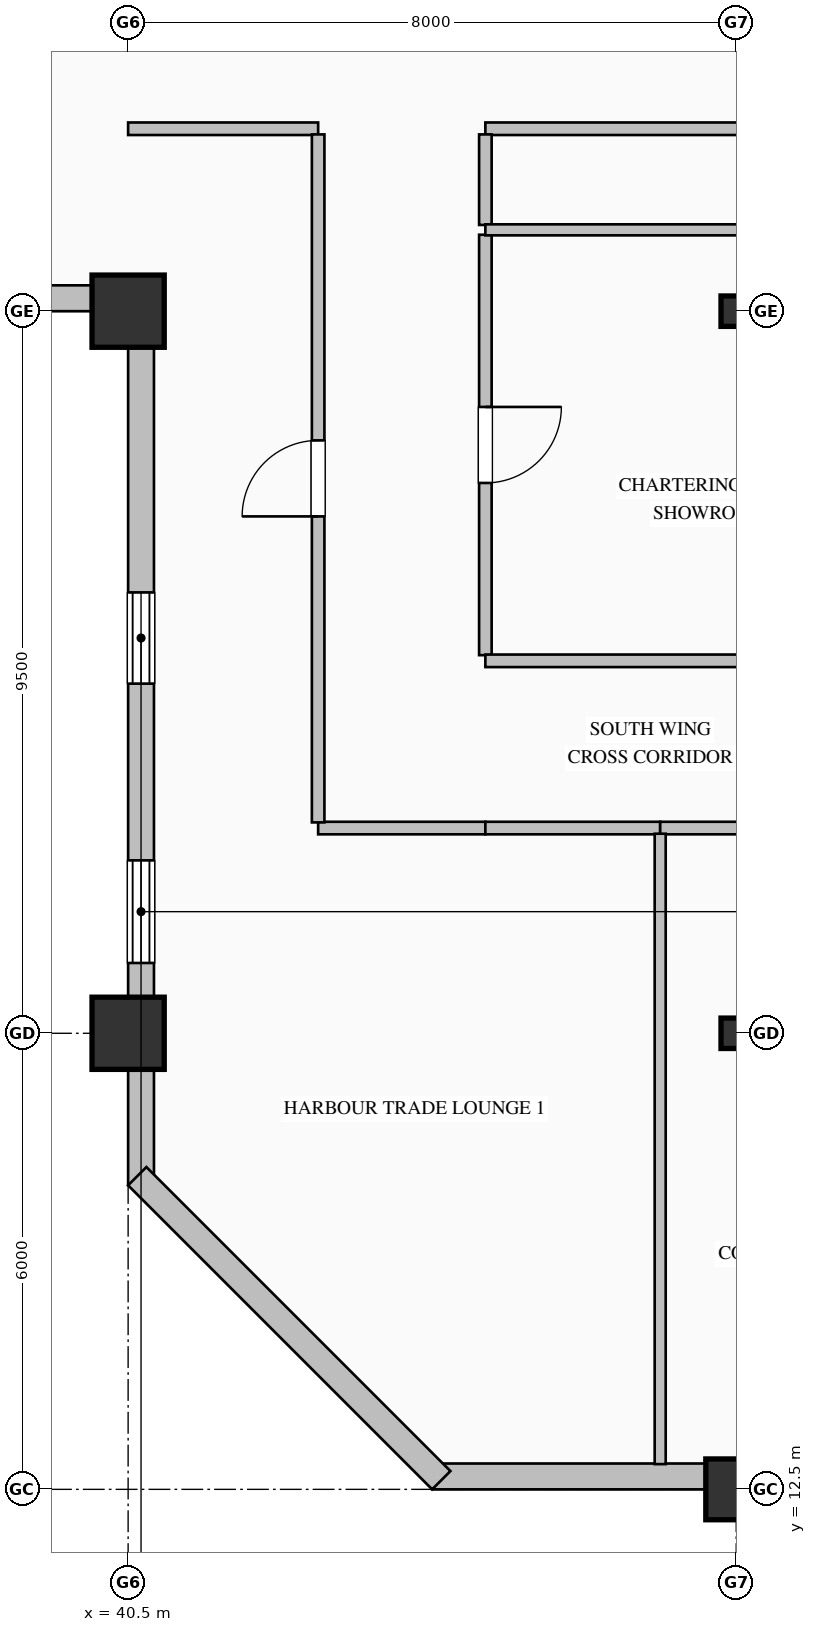
"""IFC4 building model, lengths in metres.
Left out: names, types, materials, properties, quantities, classifications, styles, units other than length and angle.
Written with IfcOpenShell. Run it as: python <this file> out.ifc"""

import sys

from ifc_helpers import new_model, si_unit, direction, frame, frame_2d, origin, origin_2d, place, context, subcontext, project, spatial, rectangle, hollow_rectangle, i_section, extrude, element, fill, save


model = new_model("IFC4")
c1 = context("Model", 3, precision=1e-05, world=origin(), true_north=direction((0.0, 1.0)))
c2 = subcontext(c1, "Body", "Model", "MODEL_VIEW")
j1 = project(units=[si_unit("LENGTHUNIT", "METRE"), si_unit("PLANEANGLEUNIT", "RADIAN")], contexts=[c1])
p1 = place(None, origin())
s1 = spatial("IfcSite", under=j1, at=p1, CompositionType="ELEMENT")
p2 = place(p1, origin())
s2 = spatial("IfcBuilding", under=s1, at=p2, CompositionType="ELEMENT")
p3 = place(p2, frame((0.0, 0.0, 265.8)))
s3 = spatial("IfcBuildingStorey", under=s2, at=p3, CompositionType="ELEMENT", Elevation=265.8)
for number, where, z_axis, x_axis in (
    (1, (40.5, 18.5, 0.0), (0.0, 0.0, 1.0), (1.0, 0.0, 0.0)),
    (2, (40.5, 28.0, 0.0), (0.0, 0.0, 1.0), (1.0, 0.0, 0.0)),
):
    element("IfcColumn", number, at=place(p3, frame(where, z_axis=z_axis, x_axis=x_axis)), inside=s3, PredefinedType="COLUMN", context=c2, shape_type="SweptSolid", body=[
        extrude(hollow_rectangle(XDim=0.95, YDim=0.95, WallThickness=0.036, at=origin_2d()), origin(), (0.0, 0.0, 1.0), 4.0),
    ])
p4 = place(p3, frame((48.5, 12.5, 0.0), z_axis=(0.0, 0.0, 1.0), x_axis=(1.0, 0.0, 0.0)))
e3 = element("IfcColumn", 3, at=p4, inside=s3, PredefinedType="COLUMN", context=c2, shape_type="SweptSolid", body=[
    extrude(hollow_rectangle(XDim=0.8, YDim=0.8, WallThickness=0.032, at=origin_2d()), origin(), (0.0, 0.0, 1.0), 4.0),
])
for number, where, z_axis, x_axis in (
    (4, (48.5, 18.5, 0.0), (0.0, 0.0, 1.0), (1.0, 0.0, 0.0)),
    (5, (48.5, 28.0, 0.0), (0.0, 0.0, 1.0), (1.0, 0.0, 0.0)),
):
    element("IfcColumn", number, at=place(p3, frame(where, z_axis=z_axis, x_axis=x_axis)), inside=s3, PredefinedType="COLUMN", context=c2, shape_type="SweptSolid", body=[
        extrude(i_section(OverallWidth=0.4, OverallDepth=0.4, WebThickness=0.013, FlangeThickness=0.021, FilletRadius=0.022, at=origin_2d()), origin(), (0.0, 0.0, 1.0), 4.0),
    ])
p5 = place(p3, frame((40.67, 16.5, 0.0), z_axis=(0.0, 0.0, 1.0), x_axis=(0.0, 1.0, 0.0)))
e6 = element("IfcWall", 6, at=p5, inside=s3, PredefinedType="SOLIDWALL", context=c2, shape_type="SweptSolid", body=[
    extrude(rectangle(XDim=11.84, YDim=0.34, at=frame_2d((5.92, 0.0))), origin(), (0.0, 0.0, 1.0), 3.187),
])
p6 = place(p5, frame((2.925, 0.0, 0.9)))
e7 = element("IfcOpeningElement", 7, at=p6, cuts=e6, PredefinedType="OPENING", context=c2, shape_type="SweptSolid", body=[
    extrude(rectangle(XDim=1.35, YDim=1.85, at=frame_2d((0.675, 0.925))), frame((0.0, 0.18, 0.0), z_axis=(0.0, -1.0, 0.0), x_axis=(1.0, 0.0, 0.0)), (0.0, 0.0, 1.0), 0.36),
])
p7 = place(p5, frame((6.6, 0.0, 0.7)))
e8 = element("IfcOpeningElement", 8, at=p7, cuts=e6, PredefinedType="OPENING", context=c2, shape_type="SweptSolid", body=[
    extrude(rectangle(XDim=1.2, YDim=1.85, at=frame_2d((0.6, 0.925))), frame((0.0, 0.18, 0.0), z_axis=(0.0, -1.0, 0.0), x_axis=(1.0, 0.0, 0.0)), (0.0, 0.0, 1.0), 0.36),
])
p8 = place(p3, frame((40.52, 28.17, 0.0), z_axis=(0.0, 0.0, 1.0), x_axis=(-1.0, 0.0, 0.0)))
e9 = element("IfcWall", 9, at=p8, inside=s3, PredefinedType="SOLIDWALL", context=c2, shape_type="SweptSolid", body=[
    extrude(rectangle(XDim=27.52, YDim=0.34, at=frame_2d((13.76, 0.0))), origin(), (0.0, 0.0, 1.0), 3.187),
])
p9 = place(p8, frame((10.125, 0.0, 0.9)))
e10 = element("IfcOpeningElement", 10, at=p9, cuts=e9, PredefinedType="OPENING", context=c2, shape_type="SweptSolid", body=[
    extrude(rectangle(XDim=1.35, YDim=1.85, at=frame_2d((0.675, 0.925))), frame((0.0, 0.18, 0.0), z_axis=(0.0, -1.0, 0.0), x_axis=(1.0, 0.0, 0.0)), (0.0, 0.0, 1.0), 0.36),
])
p10 = place(p8, frame((13.8, 0.0, 0.7)))
e11 = element("IfcOpeningElement", 11, at=p10, cuts=e9, PredefinedType="OPENING", context=c2, shape_type="SweptSolid", body=[
    extrude(rectangle(XDim=1.2, YDim=1.85, at=frame_2d((0.6, 0.925))), frame((0.0, 0.18, 0.0), z_axis=(0.0, -1.0, 0.0), x_axis=(1.0, 0.0, 0.0)), (0.0, 0.0, 1.0), 0.36),
])
p11 = place(p8, frame((17.4, 0.0, 0.9)))
e12 = element("IfcOpeningElement", 12, at=p11, cuts=e9, PredefinedType="OPENING", context=c2, shape_type="SweptSolid", body=[
    extrude(rectangle(XDim=1.2, YDim=1.85, at=frame_2d((0.6, 0.925))), frame((0.0, 0.18, 0.0), z_axis=(0.0, -1.0, 0.0), x_axis=(1.0, 0.0, 0.0)), (0.0, 0.0, 1.0), 0.36),
])
p12 = place(p8, frame((20.925, 0.0, 0.9)))
e13 = element("IfcOpeningElement", 13, at=p12, cuts=e9, PredefinedType="OPENING", context=c2, shape_type="SweptSolid", body=[
    extrude(rectangle(XDim=1.35, YDim=1.85, at=frame_2d((0.675, 0.925))), frame((0.0, 0.18, 0.0), z_axis=(0.0, -1.0, 0.0), x_axis=(1.0, 0.0, 0.0)), (0.0, 0.0, 1.0), 0.36),
])
p13 = place(p3, frame((60.0, 12.67, 0.0), z_axis=(0.0, 0.0, 1.0), x_axis=(-1.0, 0.0, 0.0)))
e14 = element("IfcWall", 14, at=p13, inside=s3, PredefinedType="SOLIDWALL", context=c2, shape_type="SweptSolid", body=[
    extrude(rectangle(XDim=15.5, YDim=0.34, at=frame_2d((7.75, 0.0))), origin(), (0.0, 0.0, 1.0), 3.325),
])
p14 = place(p3, frame((44.62, 12.62, 0.0), z_axis=(0.0, 0.0, 1.0), x_axis=(-0.707106781187, 0.707106781187, 0.0)))
e15 = element("IfcWall", 15, at=p14, inside=s3, PredefinedType="SOLIDWALL", context=c2, shape_type="SweptSolid", body=[
    extrude(rectangle(XDim=5.657, YDim=0.34, at=frame_2d((2.828, 0.0))), origin(), (0.0, 0.0, 1.0), 3.775),
])
p15 = place(p3, frame((56.5, 30.4, 0.0), z_axis=(0.0, 0.0, 1.0), x_axis=(-1.0, 0.0, 0.0)))
e16 = element("IfcWall", 16, at=p15, inside=s3, PredefinedType="PARTITIONING", context=c2, shape_type="SweptSolid", body=[
    extrude(rectangle(XDim=11.3, YDim=0.165, at=frame_2d((5.65, 0.0))), origin(), (0.0, 0.0, 1.0), 3.775),
])
p16 = place(p15, frame((5.15, 0.0, 0.0)))
e17 = element("IfcOpeningElement", 17, at=p16, cuts=e16, PredefinedType="OPENING", context=c2, shape_type="SweptSolid", body=[
    extrude(rectangle(XDim=1.0, YDim=2.15, at=frame_2d((0.5, 1.075))), frame((0.0, 0.093, 0.0), z_axis=(0.0, -1.0, 0.0), x_axis=(1.0, 0.0, 0.0)), (0.0, 0.0, 1.0), 0.185),
])
p17 = place(p3, frame((43.0, 30.4, 0.0), z_axis=(0.0, 0.0, 1.0), x_axis=(-1.0, 0.0, 0.0)))
e18 = element("IfcWall", 18, at=p17, inside=s3, PredefinedType="PARTITIONING", context=c2, shape_type="SweptSolid", body=[
    extrude(rectangle(XDim=2.5, YDim=0.165, at=frame_2d((1.25, 0.0))), origin(), (0.0, 0.0, 1.0), 3.775),
])
p18 = place(p3, frame((45.2, 30.325, 0.0), z_axis=(0.0, 0.0, 1.0), x_axis=(0.0, -1.0, 0.0)))
e19 = element("IfcWall", 19, at=p18, inside=s3, PredefinedType="PARTITIONING", context=c2, shape_type="SweptSolid", body=[
    extrude(rectangle(XDim=1.191, YDim=0.165, at=frame_2d((0.595, 0.0))), origin(), (0.0, 0.0, 1.0), 3.775),
])
p19 = place(p3, frame((45.2, 29.006, 0.0), z_axis=(0.0, 0.0, 1.0), x_axis=(0.0, -1.0, 0.0)))
e20 = element("IfcWall", 20, at=p19, inside=s3, PredefinedType="PARTITIONING", context=c2, shape_type="SweptSolid", body=[
    extrude(rectangle(XDim=5.531, YDim=0.165, at=frame_2d((2.766, 0.0))), origin(), (0.0, 0.0, 1.0), 3.775),
])
p20 = place(p19, frame((2.265, 0.0, 0.0)))
e21 = element("IfcOpeningElement", 21, at=p20, cuts=e20, PredefinedType="OPENING", context=c2, shape_type="SweptSolid", body=[
    extrude(rectangle(XDim=1.0, YDim=2.15, at=frame_2d((0.5, 1.075))), frame((0.0, 0.093, 0.0), z_axis=(0.0, -1.0, 0.0), x_axis=(1.0, 0.0, 0.0)), (0.0, 0.0, 1.0), 0.185),
])
p21 = place(p3, frame((45.2, 21.2, 0.0), z_axis=(0.0, 0.0, 1.0), x_axis=(-1.0, 0.0, 0.0)))
e22 = element("IfcWall", 22, at=p21, inside=s3, PredefinedType="PARTITIONING", context=c2, shape_type="SweptSolid", body=[
    extrude(rectangle(XDim=2.2, YDim=0.165, at=frame_2d((1.1, 0.0))), origin(), (0.0, 0.0, 1.0), 3.775),
])
p22 = place(p3, frame((43.0, 21.274, 0.0), z_axis=(0.0, 0.0, 1.0), x_axis=(0.0, 1.0, 0.0)))
e23 = element("IfcWall", 23, at=p22, inside=s3, PredefinedType="PARTITIONING", context=c2, shape_type="SweptSolid", body=[
    extrude(rectangle(XDim=9.051, YDim=0.165, at=frame_2d((4.525, 0.0))), origin(), (0.0, 0.0, 1.0), 3.775),
])
p23 = place(p22, frame((4.025, 0.0, 0.0)))
e24 = element("IfcOpeningElement", 24, at=p23, cuts=e23, PredefinedType="OPENING", context=c2, shape_type="SweptSolid", body=[
    extrude(rectangle(XDim=1.0, YDim=2.15, at=frame_2d((0.5, 1.075))), frame((0.0, 0.093, 0.0), z_axis=(0.0, -1.0, 0.0), x_axis=(1.0, 0.0, 0.0)), (0.0, 0.0, 1.0), 0.185),
])
p24 = place(p3, frame((45.2, 23.4, 0.0), z_axis=(0.0, 0.0, 1.0), x_axis=(1.0, 0.0, 0.0)))
e25 = element("IfcWall", 25, at=p24, inside=s3, PredefinedType="PARTITIONING", context=c2, shape_type="SweptSolid", body=[
    extrude(rectangle(XDim=5.3, YDim=0.165, at=frame_2d((2.65, 0.0))), origin(), (0.0, 0.0, 1.0), 3.467),
])
p25 = place(p3, frame((47.5, 21.2, 0.0), z_axis=(0.0, 0.0, 1.0), x_axis=(-1.0, 0.0, 0.0)))
e26 = element("IfcWall", 26, at=p25, inside=s3, PredefinedType="PARTITIONING", context=c2, shape_type="SweptSolid", body=[
    extrude(rectangle(XDim=2.3, YDim=0.165, at=frame_2d((1.15, 0.0))), origin(), (0.0, 0.0, 1.0), 3.775),
])
p26 = place(p3, frame((52.5, 21.2, 0.0), z_axis=(0.0, 0.0, 1.0), x_axis=(-1.0, 0.0, 0.0)))
e27 = element("IfcWall", 27, at=p26, inside=s3, PredefinedType="PARTITIONING", context=c2, shape_type="SweptSolid", body=[
    extrude(rectangle(XDim=5.0, YDim=0.165, at=frame_2d((2.5, 0.0))), origin(), (0.0, 0.0, 1.0), 3.775),
])
p27 = place(p26, frame((1.95, 0.0, 0.0)))
e28 = element("IfcOpeningElement", 28, at=p27, cuts=e27, PredefinedType="OPENING", context=c2, shape_type="SweptSolid", body=[
    extrude(rectangle(XDim=1.1, YDim=2.2, at=frame_2d((0.55, 1.1))), frame((0.0, 0.093, 0.0), z_axis=(0.0, -1.0, 0.0), x_axis=(1.0, 0.0, 0.0)), (0.0, 0.0, 1.0), 0.185),
])
p28 = place(p3, frame((50.5, 29.07, 0.0), z_axis=(0.0, 0.0, 1.0), x_axis=(-1.0, 0.0, 0.0)))
e29 = element("IfcWall", 29, at=p28, inside=s3, PredefinedType="PARTITIONING", context=c2, shape_type="SweptSolid", body=[
    extrude(rectangle(XDim=5.3, YDim=0.145, at=frame_2d((2.65, 0.0))), origin(), (0.0, 0.0, 1.0), 3.775),
])
p29 = place(p3, frame((47.5, 21.125, 0.0), z_axis=(0.0, 0.0, 1.0), x_axis=(0.0, -1.0, 0.0)))
e30 = element("IfcWall", 30, at=p29, inside=s3, PredefinedType="PARTITIONING", context=c2, shape_type="SweptSolid", body=[
    extrude(rectangle(XDim=8.293, YDim=0.145, at=frame_2d((4.147, 0.0))), origin(), (0.0, 0.0, 1.0), 3.775),
])
p30 = place(p6, origin())
e31 = element("IfcWindow", 31, at=p30, inside=s3, PartitioningType="DOUBLE_PANEL_VERTICAL", PredefinedType="WINDOW", context=c2, shape_type="SweptSolid", body=[
    extrude(rectangle(XDim=1.35, YDim=1.85, at=frame_2d((0.675, 0.925))), frame((0.0, 0.15, 0.0), z_axis=(0.0, -1.0, 0.0), x_axis=(1.0, 0.0, 0.0)), (0.0, 0.0, 1.0), 0.06),
])
fill(e7, e31)
p31 = place(p7, origin())
e32 = element("IfcWindow", 32, at=p31, inside=s3, PartitioningType="DOUBLE_PANEL_VERTICAL", PredefinedType="WINDOW", context=c2, shape_type="SweptSolid", body=[
    extrude(rectangle(XDim=1.2, YDim=1.85, at=frame_2d((0.6, 0.925))), frame((0.0, 0.15, 0.0), z_axis=(0.0, -1.0, 0.0), x_axis=(1.0, 0.0, 0.0)), (0.0, 0.0, 1.0), 0.06),
])
fill(e8, e32)
p32 = place(p20, origin())
e33 = element("IfcDoor", 33, at=p32, inside=s3, OperationType="SINGLE_SWING_LEFT", PredefinedType="DOOR", context=c2, shape_type="SweptSolid", body=[
    extrude(rectangle(XDim=1.0, YDim=2.15, at=frame_2d((0.5, 1.075))), frame((0.0, 0.025, 0.0), z_axis=(0.0, -1.0, 0.0), x_axis=(1.0, 0.0, 0.0)), (0.0, 0.0, 1.0), 0.05),
])
fill(e21, e33)
p33 = place(p23, origin())
e34 = element("IfcDoor", 34, at=p33, inside=s3, OperationType="SINGLE_SWING_LEFT", PredefinedType="DOOR", context=c2, shape_type="SweptSolid", body=[
    extrude(rectangle(XDim=1.0, YDim=2.15, at=frame_2d((0.5, 1.075))), frame((0.0, 0.025, 0.0), z_axis=(0.0, -1.0, 0.0), x_axis=(1.0, 0.0, 0.0)), (0.0, 0.0, 1.0), 0.05),
])
fill(e24, e34)
save(model, sys.argv[1])
